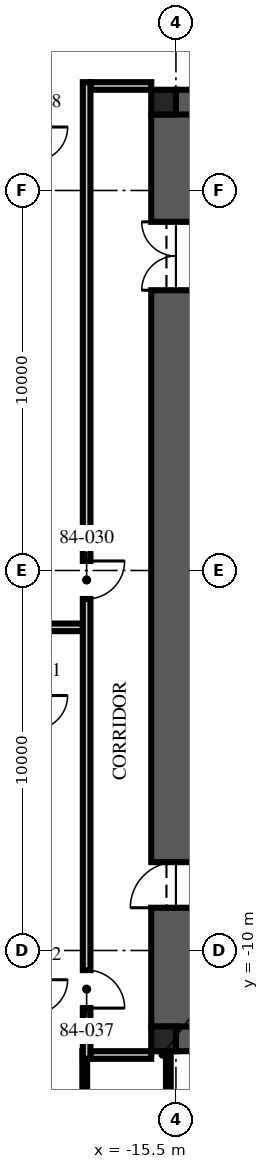
"""IFC4 building model, lengths in metres.
Left out: names, types, materials, properties, quantities, classifications, styles, units other than length and angle.
Written with IfcOpenShell. Run it as: python <this file> out.ifc"""

import sys

from ifc_helpers import new_model, si_unit, direction, frame, frame_2d, origin, origin_2d, place, context, subcontext, project, spatial, rectangle, extrude, element, fill, save


model = new_model("IFC4")
c1 = context("Model", 3, precision=1e-05, world=origin(), true_north=direction((0.0, 1.0)))
c2 = subcontext(c1, "Body", "Model", "MODEL_VIEW")
j1 = project(units=[si_unit("LENGTHUNIT", "METRE"), si_unit("PLANEANGLEUNIT", "RADIAN")], contexts=[c1])
p1 = place(None, origin())
s1 = spatial("IfcSite", under=j1, at=p1, CompositionType="ELEMENT")
p2 = place(p1, origin())
s2 = spatial("IfcBuilding", under=s1, at=p2, CompositionType="ELEMENT")
p3 = place(p2, frame((0.0, 0.0, 334.5)))
s3 = spatial("IfcBuildingStorey", under=s2, at=p3, CompositionType="ELEMENT", Elevation=334.5)
for number, where, z_axis, x_axis in (
    (1, (-15.5, 12.0, -0.25), (0.0, 0.0, 1.0), (1.0, 0.0, 0.0)),
    (2, (-15.5, -12.0, -0.25), (0.0, 0.0, 1.0), (1.0, 0.0, 0.0)),
):
    element("IfcWall", number, at=place(p3, frame(where, z_axis=z_axis, x_axis=x_axis)), inside=s3, PredefinedType="SHEAR", context=c2, shape_type="SweptSolid", body=[
        extrude(rectangle(XDim=31.0, YDim=1.3, at=frame_2d((15.5, 0.0))), origin(), (0.0, 0.0, 1.0), 3.75),
    ])
p4 = place(p3, frame((-15.5, -12.0, -0.25), z_axis=(0.0, 0.0, 1.0), x_axis=(0.0, 1.0, 0.0)))
e3 = element("IfcWall", 3, at=p4, inside=s3, PredefinedType="SHEAR", context=c2, shape_type="SweptSolid", body=[
    extrude(rectangle(XDim=24.0, YDim=1.3, at=frame_2d((12.0, 0.0))), origin(), (0.0, 0.0, 1.0), 3.75),
])
p5 = place(p4, frame((3.125, 0.0, 0.25)))
e4 = element("IfcOpeningElement", 4, at=p5, cuts=e3, PredefinedType="OPENING", context=c2, shape_type="SweptSolid", body=[
    extrude(rectangle(XDim=1.2, YDim=2.1, at=frame_2d((0.6, 1.05))), frame((0.0, 0.66, 0.0), z_axis=(0.0, -1.0, 0.0), x_axis=(1.0, 0.0, 0.0)), (0.0, 0.0, 1.0), 1.32),
])
p6 = place(p4, frame((19.375, 0.0, 0.25)))
e5 = element("IfcOpeningElement", 5, at=p6, cuts=e3, PredefinedType="OPENING", context=c2, shape_type="SweptSolid", body=[
    extrude(rectangle(XDim=1.8, YDim=2.1, at=frame_2d((0.9, 1.05))), frame((0.0, 0.66, 0.0), z_axis=(0.0, -1.0, 0.0), x_axis=(1.0, 0.0, 0.0)), (0.0, 0.0, 1.0), 1.32),
])
for number, where, z_axis, x_axis in (
    (6, (-15.825, 12.325, -0.25), (0.0, 0.0, 1.0), (1.0, 0.0, 0.0)),
    (7, (-15.825, -12.325, -0.25), (0.0, 0.0, 1.0), (1.0, 0.0, 0.0)),
):
    element("IfcColumn", number, at=place(p3, frame(where, z_axis=z_axis, x_axis=x_axis)), inside=s3, PredefinedType="COLUMN", context=c2, shape_type="SweptSolid", body=[
        extrude(rectangle(XDim=0.65, YDim=0.65, at=origin_2d()), origin(), (0.0, 0.0, 1.0), 3.75),
    ])
for number, where, z_axis, x_axis in (
    (8, (-16.15, 12.75, 0.0), (0.0, 0.0, 1.0), (-1.0, 0.0, 0.0)),
    (9, (-16.15, -12.75, 0.0), (0.0, 0.0, 1.0), (-1.0, 0.0, 0.0)),
):
    element("IfcWall", number, at=place(p3, frame(where, z_axis=z_axis, x_axis=x_axis)), inside=s3, PredefinedType="PARTITIONING", context=c2, shape_type="SweptSolid", body=[
        extrude(rectangle(XDim=1.6, YDim=0.2, at=frame_2d((0.8, 0.0))), origin(), (0.0, 0.0, 1.0), 2.6),
    ])
p7 = place(p3, frame((-17.95, -1.496, 0.0), z_axis=(0.0, 0.0, 1.0), x_axis=(-1.0, 0.0, 0.0)))
e10 = element("IfcWall", 10, at=p7, inside=s3, PredefinedType="PARTITIONING", context=c2, shape_type="SweptSolid", body=[
    extrude(rectangle(XDim=5.05, YDim=0.2, at=frame_2d((2.525, 0.0))), origin(), (0.0, 0.0, 1.0), 3.01),
])
for number, where, z_axis, x_axis in (
    (11, (-17.9, -12.65, 0.0), (0.0, 0.0, 1.0), (0.0, -1.0, 0.0)),
    (12, (-15.7, -12.65, 0.0), (0.0, 0.0, 1.0), (0.0, -1.0, 0.0)),
):
    element("IfcWall", number, at=place(p3, frame(where, z_axis=z_axis, x_axis=x_axis)), inside=s3, PredefinedType="PARTITIONING", context=c2, shape_type="SweptSolid", body=[
        extrude(rectangle(XDim=3.596, YDim=0.125, at=frame_2d((1.798, 0.0))), origin(), (0.0, 0.0, 1.0), 2.6),
    ])
p8 = place(p3, frame((-17.85, 12.85, 0.0), z_axis=(0.0, 0.0, 1.0), x_axis=(0.0, -1.0, 0.0)))
e13 = element("IfcWall", 13, at=p8, inside=s3, PredefinedType="PARTITIONING", context=c2, shape_type="SweptSolid", body=[
    extrude(rectangle(XDim=25.7, YDim=0.2, at=frame_2d((12.85, 0.0))), origin(), (0.0, 0.0, 1.0), 2.9),
])
p9 = place(p8, frame((12.6, 0.0, 0.0)))
e14 = element("IfcOpeningElement", 14, at=p9, cuts=e13, PredefinedType="OPENING", context=c2, shape_type="SweptSolid", body=[
    extrude(rectangle(XDim=1.0, YDim=2.2, at=frame_2d((0.5, 1.1))), frame((0.0, 0.11, 0.0), z_axis=(0.0, -1.0, 0.0), x_axis=(1.0, 0.0, 0.0)), (0.0, 0.0, 1.0), 0.22),
])
p10 = place(p8, frame((23.366, 0.0, 0.0)))
e15 = element("IfcOpeningElement", 15, at=p10, cuts=e13, PredefinedType="OPENING", context=c2, shape_type="SweptSolid", body=[
    extrude(rectangle(XDim=1.0, YDim=2.2, at=frame_2d((0.5, 1.1))), frame((0.0, 0.11, 0.0), z_axis=(0.0, -1.0, 0.0), x_axis=(1.0, 0.0, 0.0)), (0.0, 0.0, 1.0), 0.22),
])
p11 = place(p5, origin())
e16 = element("IfcDoor", 16, at=p11, inside=s3, OperationType="SINGLE_SWING_LEFT", PredefinedType="DOOR", context=c2, shape_type="SweptSolid", body=[
    extrude(rectangle(XDim=1.2, YDim=2.1, at=frame_2d((0.6, 1.05))), frame((0.0, 0.025, 0.0), z_axis=(0.0, -1.0, 0.0), x_axis=(1.0, 0.0, 0.0)), (0.0, 0.0, 1.0), 0.05),
])
fill(e4, e16)
p12 = place(p6, origin())
e17 = element("IfcDoor", 17, at=p12, inside=s3, OperationType="DOUBLE_DOOR_SINGLE_SWING", PredefinedType="DOOR", context=c2, shape_type="SweptSolid", body=[
    extrude(rectangle(XDim=1.8, YDim=2.1, at=frame_2d((0.9, 1.05))), frame((0.0, 0.025, 0.0), z_axis=(0.0, -1.0, 0.0), x_axis=(1.0, 0.0, 0.0)), (0.0, 0.0, 1.0), 0.05),
])
fill(e5, e17)
p13 = place(p9, origin())
e18 = element("IfcDoor", 18, at=p13, inside=s3, OperationType="SINGLE_SWING_LEFT", PredefinedType="DOOR", context=c2, shape_type="SweptSolid", body=[
    extrude(rectangle(XDim=1.0, YDim=2.2, at=frame_2d((0.5, 1.1))), frame((0.0, 0.025, 0.0), z_axis=(0.0, -1.0, 0.0), x_axis=(1.0, 0.0, 0.0)), (0.0, 0.0, 1.0), 0.05),
])
fill(e14, e18)
p14 = place(p10, origin())
e19 = element("IfcDoor", 19, at=p14, inside=s3, OperationType="SINGLE_SWING_RIGHT", PredefinedType="DOOR", context=c2, shape_type="SweptSolid", body=[
    extrude(rectangle(XDim=1.0, YDim=2.2, at=frame_2d((0.5, 1.1))), frame((0.0, 0.025, 0.0), z_axis=(0.0, -1.0, 0.0), x_axis=(1.0, 0.0, 0.0)), (0.0, 0.0, 1.0), 0.05),
])
fill(e15, e19)
save(model, sys.argv[1])
